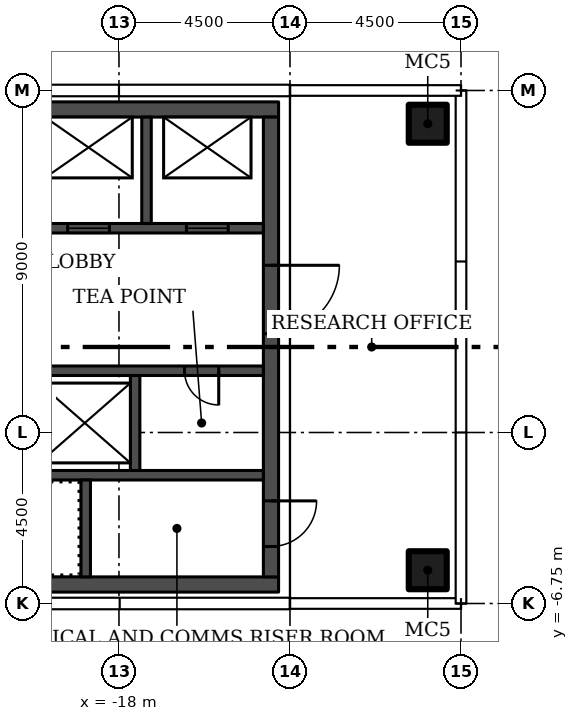
"""IFC4 building model, lengths in metres.
Left out: names, types, materials, properties, quantities, classifications, styles, units other than length and angle.
Written with IfcOpenShell. Run it as: python <this file> out.ifc"""

import sys

from ifc_helpers import new_model, si_unit, direction, frame, frame_2d, origin, origin_2d, place, context, subcontext, project, spatial, rectangle, hollow_rectangle, extrude, element, fill, save


model = new_model("IFC4")
c1 = context("Model", 3, precision=1e-05, world=origin(), true_north=direction((0.0, 1.0)))
c2 = subcontext(c1, "Body", "Model", "MODEL_VIEW")
j1 = project(units=[si_unit("LENGTHUNIT", "METRE"), si_unit("PLANEANGLEUNIT", "RADIAN")], contexts=[c1])
p1 = place(None, origin())
s1 = spatial("IfcSite", under=j1, at=p1, CompositionType="ELEMENT")
p2 = place(p1, origin())
s2 = spatial("IfcBuilding", under=s1, at=p2, CompositionType="ELEMENT")
p3 = place(p2, frame((0.0, 0.0, 194.4)))
s3 = spatial("IfcBuildingStorey", under=s2, at=p3, CompositionType="ELEMENT", Elevation=194.4)
for number, where in (
    (1, (-9.875, -5.875, 0.0)),
    (2, (-9.875, 5.875, 0.0)),
):
    element("IfcColumn", number, at=place(p3, frame(where)), inside=s3, PredefinedType="COLUMN", context=c2, shape_type="SweptSolid", body=[
        extrude(hollow_rectangle(XDim=1.0, YDim=1.0, WallThickness=0.04, at=origin_2d()), origin(), (0.0, 0.0, 1.0), 3.55),
    ])
for number, where in (
    (3, (-26.7, -6.25, 0.0)),
    (4, (-26.7, 6.25, 0.0)),
):
    element("IfcWall", number, at=place(p3, frame(where)), inside=s3, PredefinedType="SHEAR", context=c2, shape_type="SweptSolid", body=[
        extrude(rectangle(XDim=12.9, YDim=0.4, at=frame_2d((6.45, 0.0))), origin(), (0.0, 0.0, 1.0), 3.55),
    ])
p4 = place(p3, frame((-14.0, 6.05, 0.0), z_axis=(0.0, 0.0, 1.0), x_axis=(0.0, -1.0, 0.0)))
e5 = element("IfcWall", 5, at=p4, inside=s3, PredefinedType="SHEAR", context=c2, shape_type="SweptSolid", body=[
    extrude(rectangle(XDim=12.1, YDim=0.4, at=frame_2d((6.05, 0.0))), origin(), (0.0, 0.0, 1.0), 3.55),
])
p5 = place(p4, frame((10.1, 0.0, 0.0)))
e6 = element("IfcOpeningElement", 6, at=p5, cuts=e5, PredefinedType="OPENING", context=c2, shape_type="SweptSolid", body=[
    extrude(rectangle(XDim=1.2, YDim=2.1, at=frame_2d((0.6, 1.05))), frame((0.0, 0.21, 0.0), z_axis=(0.0, -1.0, 0.0), x_axis=(1.0, 0.0, 0.0)), (0.0, 0.0, 1.0), 0.42),
])
p6 = place(p4, frame((3.9, 0.0, 0.0)))
e7 = element("IfcOpeningElement", 7, at=p6, cuts=e5, PredefinedType="OPENING", context=c2, shape_type="SweptSolid", body=[
    extrude(rectangle(XDim=1.8, YDim=2.4, at=frame_2d((0.9, 1.2))), frame((0.0, 0.21, 0.0), z_axis=(0.0, -1.0, 0.0), x_axis=(1.0, 0.0, 0.0)), (0.0, 0.0, 1.0), 0.42),
])
p7 = place(p3, frame((-14.2, -3.375, 0.0), z_axis=(0.0, 0.0, 1.0), x_axis=(-1.0, 0.0, 0.0)))
e8 = element("IfcWall", 8, at=p7, inside=s3, PredefinedType="SHEAR", context=c2, shape_type="SweptSolid", body=[
    extrude(rectangle(XDim=12.1, YDim=0.25, at=frame_2d((6.05, 0.0))), origin(), (0.0, 0.0, 1.0), 3.55),
])
p8 = place(p7, frame((10.95, 0.0, 0.0)))
e9 = element("IfcOpeningElement", 9, at=p8, cuts=e8, PredefinedType="OPENING", context=c2, shape_type="SweptSolid", body=[
    extrude(rectangle(XDim=1.1, YDim=2.1, at=frame_2d((0.55, 1.05))), frame((0.0, 0.135, 0.0), z_axis=(0.0, -1.0, 0.0), x_axis=(1.0, 0.0, 0.0)), (0.0, 0.0, 1.0), 0.27),
])
p9 = place(p3, frame((-18.875, -6.05, 0.0), z_axis=(0.0, 0.0, 1.0), x_axis=(0.0, 1.0, 0.0)))
e10 = element("IfcWall", 10, at=p9, inside=s3, PredefinedType="SHEAR", context=c2, shape_type="SweptSolid", body=[
    extrude(rectangle(XDim=2.55, YDim=0.25, at=frame_2d((1.275, 0.0))), origin(), (0.0, 0.0, 1.0), 3.55),
])
p10 = place(p3, frame((-14.2, -0.625, 0.0), z_axis=(0.0, 0.0, 1.0), x_axis=(-1.0, 0.0, 0.0)))
e11 = element("IfcWall", 11, at=p10, inside=s3, PredefinedType="SHEAR", context=c2, shape_type="SweptSolid", body=[
    extrude(rectangle(XDim=12.1, YDim=0.25, at=frame_2d((6.05, 0.0))), origin(), (0.0, 0.0, 1.0), 3.55),
])
p11 = place(p10, frame((8.65, 0.0, 0.0)))
e12 = element("IfcOpeningElement", 12, at=p11, cuts=e11, PredefinedType="OPENING", context=c2, shape_type="SweptSolid", body=[
    extrude(rectangle(XDim=1.2, YDim=2.1, at=frame_2d((0.6, 1.05))), frame((0.0, 0.135, 0.0), z_axis=(0.0, -1.0, 0.0), x_axis=(1.0, 0.0, 0.0)), (0.0, 0.0, 1.0), 0.27),
])
p12 = place(p10, frame((1.175, 0.0, 0.0)))
e13 = element("IfcOpeningElement", 13, at=p12, cuts=e11, PredefinedType="OPENING", context=c2, shape_type="SweptSolid", body=[
    extrude(rectangle(XDim=0.9, YDim=2.1, at=frame_2d((0.45, 1.05))), frame((0.0, 0.135, 0.0), z_axis=(0.0, -1.0, 0.0), x_axis=(1.0, 0.0, 0.0)), (0.0, 0.0, 1.0), 0.27),
])
p13 = place(p3, frame((-17.575, -3.25, 0.0), z_axis=(0.0, 0.0, 1.0), x_axis=(0.0, 1.0, 0.0)))
e14 = element("IfcWall", 14, at=p13, inside=s3, PredefinedType="SHEAR", context=c2, shape_type="SweptSolid", body=[
    extrude(rectangle(XDim=2.5, YDim=0.25, at=frame_2d((1.25, 0.0))), origin(), (0.0, 0.0, 1.0), 3.55),
])
p14 = place(p3, frame((-26.3, 3.125, 0.0)))
e15 = element("IfcWall", 15, at=p14, inside=s3, PredefinedType="SHEAR", context=c2, shape_type="SweptSolid", body=[
    extrude(rectangle(XDim=12.1, YDim=0.25, at=frame_2d((6.05, 0.0))), origin(), (0.0, 0.0, 1.0), 3.55),
])
p15 = place(p14, frame((6.95, 0.0, 0.0)))
e16 = element("IfcOpeningElement", 16, at=p15, cuts=e15, PredefinedType="OPENING", context=c2, shape_type="SweptSolid", body=[
    extrude(rectangle(XDim=1.1, YDim=2.1, at=frame_2d((0.55, 1.05))), frame((0.0, 0.135, 0.0), z_axis=(0.0, -1.0, 0.0), x_axis=(1.0, 0.0, 0.0)), (0.0, 0.0, 1.0), 0.27),
])
p16 = place(p14, frame((10.075, 0.0, 0.0)))
e17 = element("IfcOpeningElement", 17, at=p16, cuts=e15, PredefinedType="OPENING", context=c2, shape_type="SweptSolid", body=[
    extrude(rectangle(XDim=1.1, YDim=2.1, at=frame_2d((0.55, 1.05))), frame((0.0, 0.135, 0.0), z_axis=(0.0, -1.0, 0.0), x_axis=(1.0, 0.0, 0.0)), (0.0, 0.0, 1.0), 0.27),
])
p17 = place(p14, frame((0.7, 0.0, 0.0)))
e18 = element("IfcOpeningElement", 18, at=p17, cuts=e15, PredefinedType="OPENING", context=c2, shape_type="SweptSolid", body=[
    extrude(rectangle(XDim=0.9, YDim=2.1, at=frame_2d((0.45, 1.05))), frame((0.0, 0.135, 0.0), z_axis=(0.0, -1.0, 0.0), x_axis=(1.0, 0.0, 0.0)), (0.0, 0.0, 1.0), 0.27),
])
p18 = place(p14, frame((3.625, 0.0, 0.0)))
e19 = element("IfcOpeningElement", 19, at=p18, cuts=e15, PredefinedType="OPENING", context=c2, shape_type="SweptSolid", body=[
    extrude(rectangle(XDim=0.9, YDim=2.1, at=frame_2d((0.45, 1.05))), frame((0.0, 0.135, 0.0), z_axis=(0.0, -1.0, 0.0), x_axis=(1.0, 0.0, 0.0)), (0.0, 0.0, 1.0), 0.27),
])
p19 = place(p3, frame((-17.275, 3.25, 0.0), z_axis=(0.0, 0.0, 1.0), x_axis=(0.0, 1.0, 0.0)))
e20 = element("IfcWall", 20, at=p19, inside=s3, PredefinedType="SHEAR", context=c2, shape_type="SweptSolid", body=[
    extrude(rectangle(XDim=2.8, YDim=0.25, at=frame_2d((1.4, 0.0))), origin(), (0.0, 0.0, 1.0), 3.55),
])
p20 = place(p5, origin())
e21 = element("IfcDoor", 21, at=p20, inside=s3, OperationType="SINGLE_SWING_RIGHT", PredefinedType="DOOR", context=c2, shape_type="SweptSolid", body=[
    extrude(rectangle(XDim=1.2, YDim=2.1, at=frame_2d((0.6, 1.05))), frame((0.0, 0.025, 0.0), z_axis=(0.0, -1.0, 0.0), x_axis=(1.0, 0.0, 0.0)), (0.0, 0.0, 1.0), 0.05),
])
fill(e6, e21)
p21 = place(p6, origin())
e22 = element("IfcDoor", 22, at=p21, inside=s3, OperationType="DOUBLE_DOOR_SINGLE_SWING", PredefinedType="DOOR", context=c2, shape_type="SweptSolid", body=[
    extrude(rectangle(XDim=1.8, YDim=2.4, at=frame_2d((0.9, 1.2))), frame((0.0, 0.025, 0.0), z_axis=(0.0, -1.0, 0.0), x_axis=(1.0, 0.0, 0.0)), (0.0, 0.0, 1.0), 0.05),
])
fill(e7, e22)
p22 = place(p12, origin())
e23 = element("IfcDoor", 23, at=p22, inside=s3, OperationType="SINGLE_SWING_LEFT", PredefinedType="DOOR", context=c2, shape_type="SweptSolid", body=[
    extrude(rectangle(XDim=0.9, YDim=2.1, at=frame_2d((0.45, 1.05))), frame((0.0, 0.025, 0.0), z_axis=(0.0, -1.0, 0.0), x_axis=(1.0, 0.0, 0.0)), (0.0, 0.0, 1.0), 0.05),
])
fill(e13, e23)
p23 = place(p15, origin())
e24 = element("IfcDoor", 24, at=p23, inside=s3, OperationType="SLIDING_TO_LEFT", PredefinedType="DOOR", context=c2, shape_type="SweptSolid", body=[
    extrude(rectangle(XDim=1.1, YDim=2.1, at=frame_2d((0.55, 1.05))), frame((0.0, 0.025, 0.0), z_axis=(0.0, -1.0, 0.0), x_axis=(1.0, 0.0, 0.0)), (0.0, 0.0, 1.0), 0.05),
])
fill(e16, e24)
p24 = place(p16, origin())
e25 = element("IfcDoor", 25, at=p24, inside=s3, OperationType="SLIDING_TO_LEFT", PredefinedType="DOOR", context=c2, shape_type="SweptSolid", body=[
    extrude(rectangle(XDim=1.1, YDim=2.1, at=frame_2d((0.55, 1.05))), frame((0.0, 0.025, 0.0), z_axis=(0.0, -1.0, 0.0), x_axis=(1.0, 0.0, 0.0)), (0.0, 0.0, 1.0), 0.05),
])
fill(e17, e25)
save(model, sys.argv[1])
